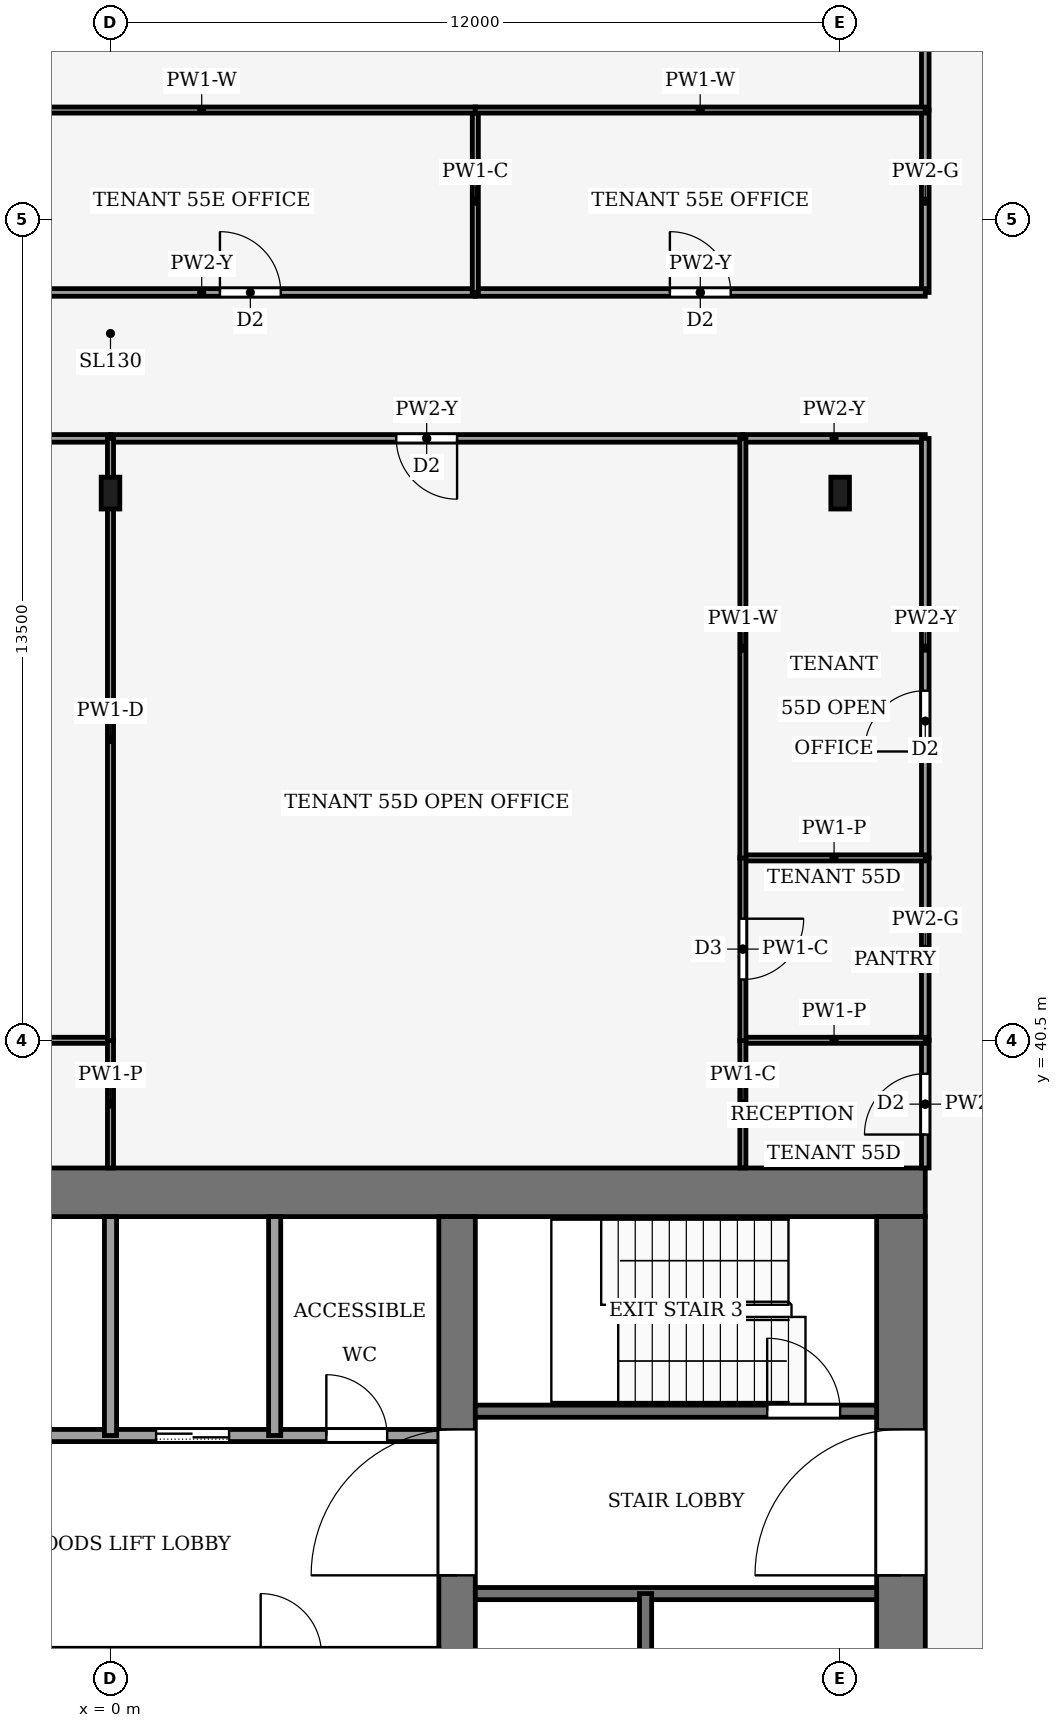
"""IFC4 building model, lengths in metres.
Left out: names, types, materials, properties, quantities, classifications, styles, units other than length and angle.
Written with IfcOpenShell. Run it as: python <this file> out.ifc"""

import sys

from ifc_helpers import new_model, si_unit, direction, frame, frame_2d, origin, origin_2d, place, context, subcontext, project, spatial, rectangle, i_section, extrude, element, fill, save


model = new_model("IFC4")
c1 = context("Model", 3, precision=1e-05, world=origin(), true_north=direction((0.0, 1.0)))
c2 = subcontext(c1, "Body", "Model", "MODEL_VIEW")
j1 = project(units=[si_unit("LENGTHUNIT", "METRE"), si_unit("PLANEANGLEUNIT", "RADIAN")], contexts=[c1])
p1 = place(None, origin())
s1 = spatial("IfcSite", under=j1, at=p1, CompositionType="ELEMENT")
p2 = place(p1, origin())
s2 = spatial("IfcBuilding", under=s1, at=p2, CompositionType="ELEMENT")
p3 = place(p2, frame((0.0, 0.0, 242.0)))
s3 = spatial("IfcBuildingStorey", under=s2, at=p3, CompositionType="ELEMENT", Elevation=242.0)
p4 = place(p3, frame((-13.4, 38.0, -0.13), z_axis=(0.0, 0.0, 1.0), x_axis=(1.0, 0.0, 0.0)))
e1 = element("IfcWall", 1, at=p4, inside=s3, PredefinedType="SHEAR", context=c2, shape_type="SweptSolid", body=[
    extrude(rectangle(XDim=26.8, YDim=0.8, at=frame_2d((13.4, 0.0))), origin(), (0.0, 0.0, 1.0), 4.0),
])
p5 = place(p3, frame((13.0, 18.4, -0.13), z_axis=(0.0, 0.0, 1.0), x_axis=(0.0, 1.0, 0.0)))
e2 = element("IfcWall", 2, at=p5, inside=s3, PredefinedType="SHEAR", context=c2, shape_type="SweptSolid", body=[
    extrude(rectangle(XDim=19.2, YDim=0.8, at=frame_2d((9.6, 0.0))), origin(), (0.0, 0.0, 1.0), 4.0),
])
p6 = place(p5, frame((2.8, 0.0, 0.13)))
e3 = element("IfcOpeningElement", 3, at=p6, cuts=e2, PredefinedType="OPENING", context=c2, shape_type="SweptSolid", body=[
    extrude(rectangle(XDim=2.4, YDim=2.4, at=frame_2d((1.2, 1.2))), frame((0.0, 0.41, 0.0), z_axis=(0.0, -1.0, 0.0), x_axis=(1.0, 0.0, 0.0)), (0.0, 0.0, 1.0), 0.82),
])
p7 = place(p5, frame((13.3, 0.0, 0.13)))
e4 = element("IfcOpeningElement", 4, at=p7, cuts=e2, PredefinedType="OPENING", context=c2, shape_type="SweptSolid", body=[
    extrude(rectangle(XDim=2.4, YDim=2.4, at=frame_2d((1.2, 1.2))), frame((0.0, 0.41, 0.0), z_axis=(0.0, -1.0, 0.0), x_axis=(1.0, 0.0, 0.0)), (0.0, 0.0, 1.0), 0.82),
])
p8 = place(p3, frame((5.7, 18.4, -0.13), z_axis=(0.0, 0.0, 1.0), x_axis=(0.0, 1.0, 0.0)))
e5 = element("IfcWall", 5, at=p8, inside=s3, PredefinedType="SHEAR", context=c2, shape_type="SweptSolid", body=[
    extrude(rectangle(XDim=19.2, YDim=0.6, at=frame_2d((9.6, 0.0))), origin(), (0.0, 0.0, 1.0), 4.0),
])
p9 = place(p8, frame((8.35, 0.0, 0.13)))
e6 = element("IfcOpeningElement", 6, at=p9, cuts=e5, PredefinedType="OPENING", context=c2, shape_type="SweptSolid", body=[
    extrude(rectangle(XDim=0.9, YDim=2.1, at=frame_2d((0.45, 1.05))), frame((0.0, 0.31, 0.0), z_axis=(0.0, -1.0, 0.0), x_axis=(1.0, 0.0, 0.0)), (0.0, 0.0, 1.0), 0.62),
])
p10 = place(p8, frame((13.3, 0.0, 0.13)))
e7 = element("IfcOpeningElement", 7, at=p10, cuts=e5, PredefinedType="OPENING", context=c2, shape_type="SweptSolid", body=[
    extrude(rectangle(XDim=2.4, YDim=2.4, at=frame_2d((1.2, 1.2))), frame((0.0, 0.31, 0.0), z_axis=(0.0, -1.0, 0.0), x_axis=(1.0, 0.0, 0.0)), (0.0, 0.0, 1.0), 0.62),
])
for number, where, z_axis, x_axis in (
    (8, (0.0, 49.5, 0.0), (0.0, 0.0, 1.0), (1.0, 0.0, 0.0)),
    (9, (12.0, 49.5, 0.0), (0.0, 0.0, 1.0), (1.0, 0.0, 0.0)),
):
    element("IfcColumn", number, at=place(p3, frame(where, z_axis=z_axis, x_axis=x_axis)), inside=s3, PredefinedType="COLUMN", context=c2, shape_type="SweptSolid", body=[
        extrude(i_section(OverallWidth=0.306, OverallDepth=0.524, WebThickness=0.012, FlangeThickness=0.04, FilletRadius=0.027, at=origin_2d()), origin(), (0.0, 0.0, 1.0), 4.0),
    ])
p11 = place(p3, frame((6.0, 31.4, 0.0), z_axis=(0.0, 0.0, 1.0), x_axis=(1.0, 0.0, 0.0)))
e10 = element("IfcWall", 10, at=p11, inside=s3, PredefinedType="PARTITIONING", context=c2, shape_type="SweptSolid", body=[
    extrude(rectangle(XDim=6.6, YDim=0.2, at=frame_2d((3.3, 0.0))), origin(), (0.0, 0.0, 1.0), 3.87),
])
p12 = place(p3, frame((-5.4, 34.0, 0.0), z_axis=(0.0, 0.0, 1.0), x_axis=(1.0, 0.0, 0.0)))
e11 = element("IfcWall", 11, at=p12, inside=s3, PredefinedType="PARTITIONING", context=c2, shape_type="SweptSolid", body=[
    extrude(rectangle(XDim=10.8, YDim=0.2, at=frame_2d((5.4, 0.0))), origin(), (0.0, 0.0, 1.0), 3.87),
])
p13 = place(p12, frame((6.15, 0.0, 0.0)))
e12 = element("IfcOpeningElement", 12, at=p13, cuts=e11, PredefinedType="OPENING", context=c2, shape_type="SweptSolid", body=[
    extrude(rectangle(XDim=1.2, YDim=2.2, at=frame_2d((0.6, 1.1))), frame((0.0, 0.11, 0.0), z_axis=(0.0, -1.0, 0.0), x_axis=(1.0, 0.0, 0.0)), (0.0, 0.0, 1.0), 0.22),
])
p14 = place(p12, frame((8.95, 0.0, 0.0)))
e13 = element("IfcOpeningElement", 13, at=p14, cuts=e11, PredefinedType="OPENING", context=c2, shape_type="SweptSolid", body=[
    extrude(rectangle(XDim=1.0, YDim=2.1, at=frame_2d((0.5, 1.05))), frame((0.0, 0.11, 0.0), z_axis=(0.0, -1.0, 0.0), x_axis=(1.0, 0.0, 0.0)), (0.0, 0.0, 1.0), 0.22),
])
p15 = place(p3, frame((6.0, 34.4, 0.0), z_axis=(0.0, 0.0, 1.0), x_axis=(1.0, 0.0, 0.0)))
e14 = element("IfcWall", 14, at=p15, inside=s3, PredefinedType="PARTITIONING", context=c2, shape_type="SweptSolid", body=[
    extrude(rectangle(XDim=6.6, YDim=0.2, at=frame_2d((3.3, 0.0))), origin(), (0.0, 0.0, 1.0), 3.87),
])
p16 = place(p15, frame((4.8, 0.0, 0.0)))
e15 = element("IfcOpeningElement", 15, at=p16, cuts=e14, PredefinedType="OPENING", context=c2, shape_type="SweptSolid", body=[
    extrude(rectangle(XDim=1.2, YDim=2.2, at=frame_2d((0.6, 1.1))), frame((0.0, 0.11, 0.0), z_axis=(0.0, -1.0, 0.0), x_axis=(1.0, 0.0, 0.0)), (0.0, 0.0, 1.0), 0.22),
])
for number, where, z_axis, x_axis in (
    (16, (0.0, 34.0, 0.0), (0.0, 0.0, 1.0), (0.0, 1.0, 0.0)),
    (17, (2.7, 34.0, 0.0), (0.0, 0.0, 1.0), (0.0, 1.0, 0.0)),
):
    element("IfcWall", number, at=place(p3, frame(where, z_axis=z_axis, x_axis=x_axis)), inside=s3, PredefinedType="PARTITIONING", context=c2, shape_type="SweptSolid", body=[
        extrude(rectangle(XDim=3.6, YDim=0.2, at=frame_2d((1.8, 0.0))), origin(), (0.0, 0.0, 1.0), 3.87),
    ])
p17 = place(p3, frame((8.8, 24.0, 0.0), z_axis=(0.0, 0.0, 1.0), x_axis=(0.0, 1.0, 0.0)))
e18 = element("IfcWall", 18, at=p17, inside=s3, PredefinedType="PARTITIONING", context=c2, shape_type="SweptSolid", body=[
    extrude(rectangle(XDim=7.4, YDim=0.2, at=frame_2d((3.7, 0.0))), origin(), (0.0, 0.0, 1.0), 3.87),
])
p18 = place(p3, frame((0.0, 50.4, 0.0), z_axis=(0.0, 0.0, 1.0), x_axis=(-1.0, 0.0, 0.0)))
e19 = element("IfcWall", 19, at=p18, inside=s3, PredefinedType="PARTITIONING", context=c2, shape_type="SweptSolid", body=[
    extrude(rectangle(XDim=10.4, YDim=0.125, at=frame_2d((5.2, 0.0))), origin(), (0.0, 0.0, 1.0), 3.24),
])
p19 = place(p18, frame((4.7, 0.0, 0.0)))
e20 = element("IfcOpeningElement", 20, at=p19, cuts=e19, PredefinedType="OPENING", context=c2, shape_type="SweptSolid", body=[
    extrude(rectangle(XDim=1.0, YDim=2.1, at=frame_2d((0.5, 1.05))), frame((0.0, 0.073, 0.0), z_axis=(0.0, -1.0, 0.0), x_axis=(1.0, 0.0, 0.0)), (0.0, 0.0, 1.0), 0.145),
])
p20 = place(p3, frame((13.4, 38.4, 0.0), z_axis=(0.0, 0.0, 1.0), x_axis=(0.0, 1.0, 0.0)))
e21 = element("IfcWall", 21, at=p20, inside=s3, PredefinedType="PARTITIONING", context=c2, shape_type="SweptSolid", body=[
    extrude(rectangle(XDim=2.1, YDim=0.125, at=frame_2d((1.05, 0.0))), origin(), (0.0, 0.0, 1.0), 3.14),
])
p21 = place(p20, frame((0.55, 0.0, 0.0)))
e22 = element("IfcOpeningElement", 22, at=p21, cuts=e21, PredefinedType="OPENING", context=c2, shape_type="SweptSolid", body=[
    extrude(rectangle(XDim=1.0, YDim=2.1, at=frame_2d((0.5, 1.05))), frame((0.0, 0.073, 0.0), z_axis=(0.0, -1.0, 0.0), x_axis=(1.0, 0.0, 0.0)), (0.0, 0.0, 1.0), 0.145),
])
p22 = place(p3, frame((13.4, 40.5, 0.0), z_axis=(0.0, 0.0, 1.0), x_axis=(0.0, 1.0, 0.0)))
e23 = element("IfcWall", 23, at=p22, inside=s3, PredefinedType="PARTITIONING", context=c2, shape_type="SweptSolid", body=[
    extrude(rectangle(XDim=3.0, YDim=0.125, at=frame_2d((1.5, 0.0))), origin(), (0.0, 0.0, 1.0), 3.87),
])
p23 = place(p3, frame((13.4, 50.4, 0.0), z_axis=(0.0, 0.0, 1.0), x_axis=(-1.0, 0.0, 0.0)))
e24 = element("IfcWall", 24, at=p23, inside=s3, PredefinedType="PARTITIONING", context=c2, shape_type="SweptSolid", body=[
    extrude(rectangle(XDim=3.0, YDim=0.125, at=frame_2d((1.5, 0.0))), origin(), (0.0, 0.0, 1.0), 3.24),
])
p24 = place(p3, frame((13.4, 43.5, 0.0), z_axis=(0.0, 0.0, 1.0), x_axis=(0.0, 1.0, 0.0)))
e25 = element("IfcWall", 25, at=p24, inside=s3, PredefinedType="PARTITIONING", context=c2, shape_type="SweptSolid", body=[
    extrude(rectangle(XDim=6.9, YDim=0.125, at=frame_2d((3.45, 0.0))), origin(), (0.0, 0.0, 1.0), 3.24),
])
p25 = place(p24, frame((1.75, 0.0, 0.0)))
e26 = element("IfcOpeningElement", 26, at=p25, cuts=e25, PredefinedType="OPENING", context=c2, shape_type="SweptSolid", body=[
    extrude(rectangle(XDim=1.0, YDim=2.1, at=frame_2d((0.5, 1.05))), frame((0.0, 0.073, 0.0), z_axis=(0.0, -1.0, 0.0), x_axis=(1.0, 0.0, 0.0)), (0.0, 0.0, 1.0), 0.145),
])
p26 = place(p3, frame((10.4, 50.4, 0.0), z_axis=(0.0, 0.0, 1.0), x_axis=(-1.0, 0.0, 0.0)))
e27 = element("IfcWall", 27, at=p26, inside=s3, PredefinedType="PARTITIONING", context=c2, shape_type="SweptSolid", body=[
    extrude(rectangle(XDim=10.4, YDim=0.125, at=frame_2d((5.2, 0.0))), origin(), (0.0, 0.0, 1.0), 3.24),
])
p27 = place(p26, frame((4.7, 0.0, 0.0)))
e28 = element("IfcOpeningElement", 28, at=p27, cuts=e27, PredefinedType="OPENING", context=c2, shape_type="SweptSolid", body=[
    extrude(rectangle(XDim=1.0, YDim=2.1, at=frame_2d((0.5, 1.05))), frame((0.0, 0.073, 0.0), z_axis=(0.0, -1.0, 0.0), x_axis=(1.0, 0.0, 0.0)), (0.0, 0.0, 1.0), 0.145),
])
p28 = place(p3, frame((-3.0, 52.8, 0.0), z_axis=(0.0, 0.0, 1.0), x_axis=(1.0, 0.0, 0.0)))
e29 = element("IfcWall", 29, at=p28, inside=s3, PredefinedType="PARTITIONING", context=c2, shape_type="SweptSolid", body=[
    extrude(rectangle(XDim=9.0, YDim=0.125, at=frame_2d((4.5, 0.0))), origin(), (0.0, 0.0, 1.0), 3.24),
])
p29 = place(p28, frame((4.8, 0.0, 0.0)))
e30 = element("IfcOpeningElement", 30, at=p29, cuts=e29, PredefinedType="OPENING", context=c2, shape_type="SweptSolid", body=[
    extrude(rectangle(XDim=1.0, YDim=2.1, at=frame_2d((0.5, 1.05))), frame((0.0, 0.073, 0.0), z_axis=(0.0, -1.0, 0.0), x_axis=(1.0, 0.0, 0.0)), (0.0, 0.0, 1.0), 0.145),
])
p30 = place(p3, frame((13.4, 52.8, 0.0), z_axis=(0.0, 0.0, 1.0), x_axis=(0.0, 1.0, 0.0)))
e31 = element("IfcWall", 31, at=p30, inside=s3, PredefinedType="PARTITIONING", context=c2, shape_type="SweptSolid", body=[
    extrude(rectangle(XDim=3.0, YDim=0.125, at=frame_2d((1.5, 0.0))), origin(), (0.0, 0.0, 1.0), 3.87),
])
p31 = place(p3, frame((6.0, 52.8, 0.0), z_axis=(0.0, 0.0, 1.0), x_axis=(1.0, 0.0, 0.0)))
e32 = element("IfcWall", 32, at=p31, inside=s3, PredefinedType="PARTITIONING", context=c2, shape_type="SweptSolid", body=[
    extrude(rectangle(XDim=7.4, YDim=0.125, at=frame_2d((3.7, 0.0))), origin(), (0.0, 0.0, 1.0), 3.24),
])
p32 = place(p31, frame((3.2, 0.0, 0.0)))
e33 = element("IfcOpeningElement", 33, at=p32, cuts=e32, PredefinedType="OPENING", context=c2, shape_type="SweptSolid", body=[
    extrude(rectangle(XDim=1.0, YDim=2.1, at=frame_2d((0.5, 1.05))), frame((0.0, 0.073, 0.0), z_axis=(0.0, -1.0, 0.0), x_axis=(1.0, 0.0, 0.0)), (0.0, 0.0, 1.0), 0.145),
])
p33 = place(p3, frame((13.4, 55.8, 0.0), z_axis=(0.0, 0.0, 1.0), x_axis=(0.0, 1.0, 0.0)))
e34 = element("IfcWall", 34, at=p33, inside=s3, PredefinedType="PARTITIONING", context=c2, shape_type="SweptSolid", body=[
    extrude(rectangle(XDim=5.7, YDim=0.125, at=frame_2d((2.85, 0.0))), origin(), (0.0, 0.0, 1.0), 3.87),
])
p34 = place(p3, frame((0.0, 40.5, 0.0), z_axis=(0.0, 0.0, 1.0), x_axis=(-1.0, 0.0, 0.0)))
e35 = element("IfcWall", 35, at=p34, inside=s3, PredefinedType="PARTITIONING", context=c2, shape_type="SweptSolid", body=[
    extrude(rectangle(XDim=10.4, YDim=0.1, at=frame_2d((5.2, 0.0))), origin(), (0.0, 0.0, 1.0), 3.44),
])
p35 = place(p34, frame((4.7, 0.0, 0.0)))
e36 = element("IfcOpeningElement", 36, at=p35, cuts=e35, PredefinedType="OPENING", context=c2, shape_type="SweptSolid", body=[
    extrude(rectangle(XDim=1.0, YDim=2.1, at=frame_2d((0.5, 1.05))), frame((0.0, 0.06, 0.0), z_axis=(0.0, -1.0, 0.0), x_axis=(1.0, 0.0, 0.0)), (0.0, 0.0, 1.0), 0.12),
])
p36 = place(p3, frame((0.0, 38.4, 0.0), z_axis=(0.0, 0.0, 1.0), x_axis=(0.0, 1.0, 0.0)))
e37 = element("IfcWall", 37, at=p36, inside=s3, PredefinedType="PARTITIONING", context=c2, shape_type="SweptSolid", body=[
    extrude(rectangle(XDim=2.104, YDim=0.1, at=frame_2d((1.052, 0.0))), origin(), (0.0, 0.0, 1.0), 3.44),
])
p37 = place(p3, frame((0.0, 40.496, 0.0), z_axis=(0.0, 0.0, 1.0), x_axis=(0.0, 1.0, 0.0)))
e38 = element("IfcWall", 38, at=p37, inside=s3, PredefinedType="PARTITIONING", context=c2, shape_type="SweptSolid", body=[
    extrude(rectangle(XDim=9.904, YDim=0.1, at=frame_2d((4.952, 0.0))), origin(), (0.0, 0.0, 1.0), 3.29),
])
p38 = place(p3, frame((13.4, 40.5, 0.0), z_axis=(0.0, 0.0, 1.0), x_axis=(-1.0, 0.0, 0.0)))
e39 = element("IfcWall", 39, at=p38, inside=s3, PredefinedType="PARTITIONING", context=c2, shape_type="SweptSolid", body=[
    extrude(rectangle(XDim=3.0, YDim=0.1, at=frame_2d((1.5, 0.0))), origin(), (0.0, 0.0, 1.0), 3.44),
])
p39 = place(p3, frame((10.4, 40.504, 0.0), z_axis=(0.0, 0.0, 1.0), x_axis=(0.0, -1.0, 0.0)))
e40 = element("IfcWall", 40, at=p39, inside=s3, PredefinedType="PARTITIONING", context=c2, shape_type="SweptSolid", body=[
    extrude(rectangle(XDim=2.104, YDim=0.1, at=frame_2d((1.052, 0.0))), origin(), (0.0, 0.0, 1.0), 3.87),
])
p40 = place(p3, frame((13.4, 43.5, 0.0), z_axis=(0.0, 0.0, 1.0), x_axis=(-1.0, 0.0, 0.0)))
e41 = element("IfcWall", 41, at=p40, inside=s3, PredefinedType="PARTITIONING", context=c2, shape_type="SweptSolid", body=[
    extrude(rectangle(XDim=3.0, YDim=0.1, at=frame_2d((1.5, 0.0))), origin(), (0.0, 0.0, 1.0), 3.44),
])
p41 = place(p3, frame((10.4, 43.504, 0.0), z_axis=(0.0, 0.0, 1.0), x_axis=(0.0, -1.0, 0.0)))
e42 = element("IfcWall", 42, at=p41, inside=s3, PredefinedType="PARTITIONING", context=c2, shape_type="SweptSolid", body=[
    extrude(rectangle(XDim=3.008, YDim=0.1, at=frame_2d((1.504, 0.0))), origin(), (0.0, 0.0, 1.0), 3.87),
])
p42 = place(p41, frame((1.004, 0.0, 0.0)))
e43 = element("IfcOpeningElement", 43, at=p42, cuts=e42, PredefinedType="OPENING", context=c2, shape_type="SweptSolid", body=[
    extrude(rectangle(XDim=1.0, YDim=2.1, at=frame_2d((0.5, 1.05))), frame((0.0, 0.06, 0.0), z_axis=(0.0, -1.0, 0.0), x_axis=(1.0, 0.0, 0.0)), (0.0, 0.0, 1.0), 0.12),
])
p43 = place(p3, frame((10.4, 50.4, 0.0), z_axis=(0.0, 0.0, 1.0), x_axis=(0.0, -1.0, 0.0)))
e44 = element("IfcWall", 44, at=p43, inside=s3, PredefinedType="PARTITIONING", context=c2, shape_type="SweptSolid", body=[
    extrude(rectangle(XDim=6.904, YDim=0.1, at=frame_2d((3.452, 0.0))), origin(), (0.0, 0.0, 1.0), 3.24),
])
p44 = place(p3, frame((6.0, 52.8, 0.0), z_axis=(0.0, 0.0, 1.0), x_axis=(0.0, 1.0, 0.0)))
e45 = element("IfcWall", 45, at=p44, inside=s3, PredefinedType="PARTITIONING", context=c2, shape_type="SweptSolid", body=[
    extrude(rectangle(XDim=3.0, YDim=0.1, at=frame_2d((1.5, 0.0))), origin(), (0.0, 0.0, 1.0), 3.87),
])
p45 = place(p3, frame((6.004, 55.8, 0.0), z_axis=(0.0, 0.0, 1.0), x_axis=(-1.0, 0.0, 0.0)))
e46 = element("IfcWall", 46, at=p45, inside=s3, PredefinedType="PARTITIONING", context=c2, shape_type="SweptSolid", body=[
    extrude(rectangle(XDim=9.008, YDim=0.1, at=frame_2d((4.504, 0.0))), origin(), (0.0, 0.0, 1.0), 3.24),
])
p46 = place(p3, frame((13.4, 55.8, 0.0), z_axis=(0.0, 0.0, 1.0), x_axis=(-1.0, 0.0, 0.0)))
e47 = element("IfcWall", 47, at=p46, inside=s3, PredefinedType="PARTITIONING", context=c2, shape_type="SweptSolid", body=[
    extrude(rectangle(XDim=7.404, YDim=0.1, at=frame_2d((3.702, 0.0))), origin(), (0.0, 0.0, 1.0), 3.24),
])
p47 = place(p13, origin())
e48 = element("IfcDoor", 48, at=p47, inside=s3, OperationType="SLIDING_TO_LEFT", PredefinedType="DOOR", context=c2, shape_type="SweptSolid", body=[
    extrude(rectangle(XDim=1.2, YDim=2.2, at=frame_2d((0.6, 1.1))), frame((0.0, 0.025, 0.0), z_axis=(0.0, -1.0, 0.0), x_axis=(1.0, 0.0, 0.0)), (0.0, 0.0, 1.0), 0.05),
])
fill(e12, e48)
p48 = place(p14, origin())
e49 = element("IfcDoor", 49, at=p48, inside=s3, OperationType="SINGLE_SWING_LEFT", PredefinedType="DOOR", context=c2, shape_type="SweptSolid", body=[
    extrude(rectangle(XDim=1.0, YDim=2.1, at=frame_2d((0.5, 1.05))), frame((0.0, 0.025, 0.0), z_axis=(0.0, -1.0, 0.0), x_axis=(1.0, 0.0, 0.0)), (0.0, 0.0, 1.0), 0.05),
])
fill(e13, e49)
p49 = place(p16, origin())
e50 = element("IfcDoor", 50, at=p49, inside=s3, OperationType="SINGLE_SWING_RIGHT", PredefinedType="DOOR", context=c2, shape_type="SweptSolid", body=[
    extrude(rectangle(XDim=1.2, YDim=2.2, at=frame_2d((0.6, 1.1))), frame((0.0, 0.025, 0.0), z_axis=(0.0, -1.0, 0.0), x_axis=(1.0, 0.0, 0.0)), (0.0, 0.0, 1.0), 0.05),
])
fill(e15, e50)
p50 = place(p10, origin())
e51 = element("IfcDoor", 51, at=p50, inside=s3, OperationType="DOUBLE_DOOR_SINGLE_SWING", PredefinedType="DOOR", context=c2, shape_type="SweptSolid", body=[
    extrude(rectangle(XDim=2.4, YDim=2.4, at=frame_2d((1.2, 1.2))), frame((0.0, 0.025, 0.0), z_axis=(0.0, -1.0, 0.0), x_axis=(1.0, 0.0, 0.0)), (0.0, 0.0, 1.0), 0.05),
])
fill(e7, e51)
p51 = place(p7, origin())
e52 = element("IfcDoor", 52, at=p51, inside=s3, OperationType="DOUBLE_DOOR_SINGLE_SWING", PredefinedType="DOOR", context=c2, shape_type="SweptSolid", body=[
    extrude(rectangle(XDim=2.4, YDim=2.4, at=frame_2d((1.2, 1.2))), frame((0.0, 0.025, 0.0), z_axis=(0.0, -1.0, 0.0), x_axis=(1.0, 0.0, 0.0)), (0.0, 0.0, 1.0), 0.05),
])
fill(e4, e52)
p52 = place(p21, origin())
e53 = element("IfcDoor", 53, at=p52, inside=s3, OperationType="SINGLE_SWING_RIGHT", PredefinedType="DOOR", context=c2, shape_type="SweptSolid", body=[
    extrude(rectangle(XDim=1.0, YDim=2.1, at=frame_2d((0.5, 1.05))), frame((0.0, 0.025, 0.0), z_axis=(0.0, -1.0, 0.0), x_axis=(1.0, 0.0, 0.0)), (0.0, 0.0, 1.0), 0.05),
])
fill(e22, e53)
p53 = place(p25, origin())
e54 = element("IfcDoor", 54, at=p53, inside=s3, OperationType="SINGLE_SWING_LEFT", PredefinedType="DOOR", context=c2, shape_type="SweptSolid", body=[
    extrude(rectangle(XDim=1.0, YDim=2.1, at=frame_2d((0.5, 1.05))), frame((0.0, 0.025, 0.0), z_axis=(0.0, -1.0, 0.0), x_axis=(1.0, 0.0, 0.0)), (0.0, 0.0, 1.0), 0.05),
])
fill(e26, e54)
p54 = place(p27, origin())
e55 = element("IfcDoor", 55, at=p54, inside=s3, OperationType="SINGLE_SWING_RIGHT", PredefinedType="DOOR", context=c2, shape_type="SweptSolid", body=[
    extrude(rectangle(XDim=1.0, YDim=2.1, at=frame_2d((0.5, 1.05))), frame((0.0, 0.025, 0.0), z_axis=(0.0, -1.0, 0.0), x_axis=(1.0, 0.0, 0.0)), (0.0, 0.0, 1.0), 0.05),
])
fill(e28, e55)
p55 = place(p29, origin())
e56 = element("IfcDoor", 56, at=p55, inside=s3, OperationType="SINGLE_SWING_RIGHT", PredefinedType="DOOR", context=c2, shape_type="SweptSolid", body=[
    extrude(rectangle(XDim=1.0, YDim=2.1, at=frame_2d((0.5, 1.05))), frame((0.0, 0.025, 0.0), z_axis=(0.0, -1.0, 0.0), x_axis=(1.0, 0.0, 0.0)), (0.0, 0.0, 1.0), 0.05),
])
fill(e30, e56)
p56 = place(p32, origin())
e57 = element("IfcDoor", 57, at=p56, inside=s3, OperationType="SINGLE_SWING_LEFT", PredefinedType="DOOR", context=c2, shape_type="SweptSolid", body=[
    extrude(rectangle(XDim=1.0, YDim=2.1, at=frame_2d((0.5, 1.05))), frame((0.0, 0.025, 0.0), z_axis=(0.0, -1.0, 0.0), x_axis=(1.0, 0.0, 0.0)), (0.0, 0.0, 1.0), 0.05),
])
fill(e33, e57)
p57 = place(p42, origin())
e58 = element("IfcDoor", 58, at=p57, inside=s3, OperationType="SINGLE_SWING_LEFT", PredefinedType="DOOR", context=c2, shape_type="SweptSolid", body=[
    extrude(rectangle(XDim=1.0, YDim=2.1, at=frame_2d((0.5, 1.05))), frame((0.0, 0.025, 0.0), z_axis=(0.0, -1.0, 0.0), x_axis=(1.0, 0.0, 0.0)), (0.0, 0.0, 1.0), 0.05),
])
fill(e43, e58)
save(model, sys.argv[1])
